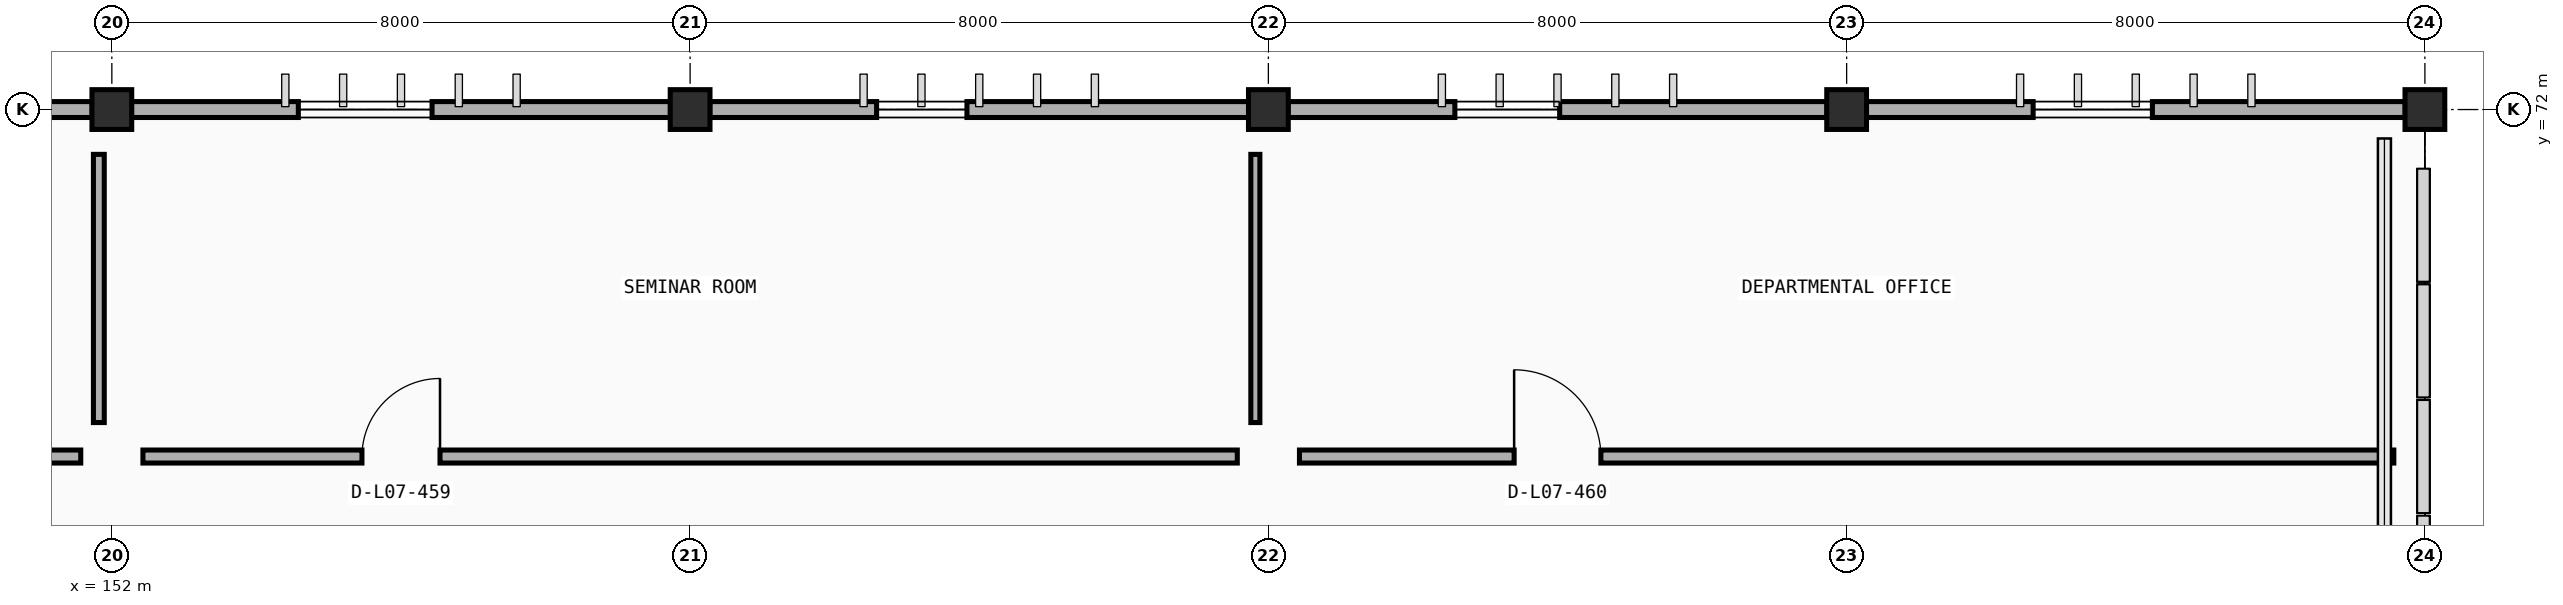
"""IFC4 building model, lengths in metres.
Left out: names, types, materials, properties, quantities, classifications, styles, units other than length and angle.
Written with IfcOpenShell. Run it as: python <this file> out.ifc"""

import sys

from ifc_helpers import new_model, si_unit, direction, frame, frame_2d, origin, origin_2d, place, context, subcontext, project, spatial, rectangle, extrude, element, fill, save


model = new_model("IFC4")
c1 = context("Model", 3, precision=1e-05, world=origin(), true_north=direction((0.0, 1.0)))
c2 = subcontext(c1, "Body", "Model", "MODEL_VIEW")
j1 = project(units=[si_unit("LENGTHUNIT", "METRE"), si_unit("PLANEANGLEUNIT", "RADIAN")], contexts=[c1])
p1 = place(None, origin())
s1 = spatial("IfcSite", under=j1, at=p1, CompositionType="ELEMENT")
p2 = place(p1, origin())
s2 = spatial("IfcBuilding", under=s1, at=p2, CompositionType="ELEMENT")
p3 = place(p2, frame((0.0, 0.0, 26.4)))
s3 = spatial("IfcBuildingStorey", under=s2, at=p3, CompositionType="ELEMENT", Elevation=26.4)
for number, where, z_axis, x_axis in (
    (1, (152.0, 72.0, 0.0), (0.0, 0.0, 1.0), (1.0, 0.0, 0.0)),
    (2, (160.0, 72.0, 0.0), (0.0, 0.0, 1.0), (1.0, 0.0, 0.0)),
    (3, (168.0, 72.0, 0.0), (0.0, 0.0, 1.0), (1.0, 0.0, 0.0)),
    (4, (176.0, 72.0, 0.0), (0.0, 0.0, 1.0), (1.0, 0.0, 0.0)),
    (5, (184.0, 72.0, 0.0), (0.0, 0.0, 1.0), (1.0, 0.0, 0.0)),
):
    element("IfcColumn", number, at=place(p3, frame(where, z_axis=z_axis, x_axis=x_axis)), inside=s3, PredefinedType="COLUMN", context=c2, shape_type="SweptSolid", body=[
        extrude(rectangle(XDim=0.55, YDim=0.55, at=origin_2d()), origin(), (0.0, 0.0, 1.0), 4.2),
    ])
p4 = place(p3, frame((144.272, 72.0, 0.0), z_axis=(0.0, 0.0, 1.0), x_axis=(1.0, 0.0, 0.0)))
e6 = element("IfcWall", 6, at=p4, inside=s3, PredefinedType="STANDARD", context=c2, shape_type="SweptSolid", body=[
    extrude(rectangle(XDim=7.456, YDim=0.22, at=frame_2d((3.728, 0.0))), origin(), (0.0, 0.0, 1.0), 3.35),
])
p5 = place(p4, frame((2.308, 0.0, 0.9)))
e7 = element("IfcOpeningElement", 7, at=p5, cuts=e6, PredefinedType="OPENING", context=c2, shape_type="SweptSolid", body=[
    extrude(rectangle(XDim=1.65, YDim=1.25, at=frame_2d((0.825, 0.625))), frame((0.0, 0.12, 0.0), z_axis=(0.0, -1.0, 0.0), x_axis=(1.0, 0.0, 0.0)), (0.0, 0.0, 1.0), 0.24),
])
p6 = place(p3, frame((152.272, 72.0, 0.0), z_axis=(0.0, 0.0, 1.0), x_axis=(1.0, 0.0, 0.0)))
e8 = element("IfcWall", 8, at=p6, inside=s3, PredefinedType="STANDARD", context=c2, shape_type="SweptSolid", body=[
    extrude(rectangle(XDim=7.456, YDim=0.22, at=frame_2d((3.728, 0.0))), origin(), (0.0, 0.0, 1.0), 3.35),
])
p7 = place(p6, frame((2.308, 0.0, 0.9)))
e9 = element("IfcOpeningElement", 9, at=p7, cuts=e8, PredefinedType="OPENING", context=c2, shape_type="SweptSolid", body=[
    extrude(rectangle(XDim=1.85, YDim=1.25, at=frame_2d((0.925, 0.625))), frame((0.0, 0.12, 0.0), z_axis=(0.0, -1.0, 0.0), x_axis=(1.0, 0.0, 0.0)), (0.0, 0.0, 1.0), 0.24),
])
p8 = place(p3, frame((160.272, 72.0, 0.0), z_axis=(0.0, 0.0, 1.0), x_axis=(1.0, 0.0, 0.0)))
e10 = element("IfcWall", 10, at=p8, inside=s3, PredefinedType="STANDARD", context=c2, shape_type="SweptSolid", body=[
    extrude(rectangle(XDim=7.456, YDim=0.22, at=frame_2d((3.728, 0.0))), origin(), (0.0, 0.0, 1.0), 3.35),
])
p9 = place(p8, frame((2.308, 0.0, 0.9)))
e11 = element("IfcOpeningElement", 11, at=p9, cuts=e10, PredefinedType="OPENING", context=c2, shape_type="SweptSolid", body=[
    extrude(rectangle(XDim=1.25, YDim=1.25, at=frame_2d((0.625, 0.625))), frame((0.0, 0.12, 0.0), z_axis=(0.0, -1.0, 0.0), x_axis=(1.0, 0.0, 0.0)), (0.0, 0.0, 1.0), 0.24),
])
p10 = place(p3, frame((168.272, 72.0, 0.0), z_axis=(0.0, 0.0, 1.0), x_axis=(1.0, 0.0, 0.0)))
e12 = element("IfcWall", 12, at=p10, inside=s3, PredefinedType="STANDARD", context=c2, shape_type="SweptSolid", body=[
    extrude(rectangle(XDim=7.456, YDim=0.22, at=frame_2d((3.728, 0.0))), origin(), (0.0, 0.0, 1.0), 3.35),
])
p11 = place(p10, frame((2.308, 0.0, 0.9)))
e13 = element("IfcOpeningElement", 13, at=p11, cuts=e12, PredefinedType="OPENING", context=c2, shape_type="SweptSolid", body=[
    extrude(rectangle(XDim=1.45, YDim=1.25, at=frame_2d((0.725, 0.625))), frame((0.0, 0.12, 0.0), z_axis=(0.0, -1.0, 0.0), x_axis=(1.0, 0.0, 0.0)), (0.0, 0.0, 1.0), 0.24),
])
p12 = place(p3, frame((176.272, 72.0, 0.0), z_axis=(0.0, 0.0, 1.0), x_axis=(1.0, 0.0, 0.0)))
e14 = element("IfcWall", 14, at=p12, inside=s3, PredefinedType="STANDARD", context=c2, shape_type="SweptSolid", body=[
    extrude(rectangle(XDim=7.456, YDim=0.22, at=frame_2d((3.728, 0.0))), origin(), (0.0, 0.0, 1.0), 3.35),
])
p13 = place(p12, frame((2.308, 0.0, 0.9)))
e15 = element("IfcOpeningElement", 15, at=p13, cuts=e14, PredefinedType="OPENING", context=c2, shape_type="SweptSolid", body=[
    extrude(rectangle(XDim=1.65, YDim=1.25, at=frame_2d((0.825, 0.625))), frame((0.0, 0.12, 0.0), z_axis=(0.0, -1.0, 0.0), x_axis=(1.0, 0.0, 0.0)), (0.0, 0.0, 1.0), 0.24),
])
p14 = place(p3, frame((183.76, 71.78, 0.0), z_axis=(0.0, 0.0, 1.0), x_axis=(-1.0, 0.0, 0.0)))
e16 = element("IfcWall", 16, at=p14, inside=s3, PredefinedType="PARAPET", context=c2, shape_type="SweptSolid", body=[
    extrude(rectangle(XDim=0.32, YDim=0.2, at=frame_2d((0.16, 0.0))), origin(), (0.0, 0.0, 1.0), 3.35),
])
p15 = place(p3, frame((128.43, 67.2, 0.0), z_axis=(0.0, 0.0, 1.0), x_axis=(1.0, 0.0, 0.0)))
e17 = element("IfcWall", 17, at=p15, inside=s3, PredefinedType="PARTITIONING", context=c2, shape_type="SweptSolid", body=[
    extrude(rectangle(XDim=23.14, YDim=0.18, at=frame_2d((11.57, 0.0))), origin(), (0.0, 0.0, 1.0), 3.3),
])
p16 = place(p15, frame((2.85, 0.0, 0.0)))
e18 = element("IfcOpeningElement", 18, at=p16, cuts=e17, PredefinedType="OPENING", context=c2, shape_type="SweptSolid", body=[
    extrude(rectangle(XDim=1.44, YDim=2.2, at=frame_2d((0.72, 1.1))), frame((0.0, 0.1, 0.0), z_axis=(0.0, -1.0, 0.0), x_axis=(1.0, 0.0, 0.0)), (0.0, 0.0, 1.0), 0.2),
])
p17 = place(p3, frame((151.82, 67.67, 0.0), z_axis=(0.0, 0.0, 1.0), x_axis=(0.0, 1.0, 0.0)))
e19 = element("IfcWall", 19, at=p17, inside=s3, PredefinedType="PARTITIONING", context=c2, shape_type="SweptSolid", body=[
    extrude(rectangle(XDim=3.71, YDim=0.15, at=frame_2d((1.855, 0.0))), origin(), (0.0, 0.0, 1.0), 3.3),
])
p18 = place(p3, frame((152.43, 67.2, 0.0), z_axis=(0.0, 0.0, 1.0), x_axis=(1.0, 0.0, 0.0)))
e20 = element("IfcWall", 20, at=p18, inside=s3, PredefinedType="PARTITIONING", context=c2, shape_type="SweptSolid", body=[
    extrude(rectangle(XDim=15.14, YDim=0.18, at=frame_2d((7.57, 0.0))), origin(), (0.0, 0.0, 1.0), 3.3),
])
p19 = place(p18, frame((3.03, 0.0, 0.0)))
e21 = element("IfcOpeningElement", 21, at=p19, cuts=e20, PredefinedType="OPENING", context=c2, shape_type="SweptSolid", body=[
    extrude(rectangle(XDim=1.08, YDim=2.15, at=frame_2d((0.54, 1.075))), frame((0.0, 0.1, 0.0), z_axis=(0.0, -1.0, 0.0), x_axis=(1.0, 0.0, 0.0)), (0.0, 0.0, 1.0), 0.2),
])
p20 = place(p3, frame((167.82, 67.67, 0.0), z_axis=(0.0, 0.0, 1.0), x_axis=(0.0, 1.0, 0.0)))
e22 = element("IfcWall", 22, at=p20, inside=s3, PredefinedType="PARTITIONING", context=c2, shape_type="SweptSolid", body=[
    extrude(rectangle(XDim=3.71, YDim=0.125, at=frame_2d((1.855, 0.0))), origin(), (0.0, 0.0, 1.0), 3.3),
])
p21 = place(p3, frame((168.43, 67.2, 0.0), z_axis=(0.0, 0.0, 1.0), x_axis=(1.0, 0.0, 0.0)))
e23 = element("IfcWall", 23, at=p21, inside=s3, PredefinedType="PARTITIONING", context=c2, shape_type="SweptSolid", body=[
    extrude(rectangle(XDim=15.14, YDim=0.18, at=frame_2d((7.57, 0.0))), origin(), (0.0, 0.0, 1.0), 3.3),
])
p22 = place(p21, frame((2.97, 0.0, 0.0)))
e24 = element("IfcOpeningElement", 24, at=p22, cuts=e23, PredefinedType="OPENING", context=c2, shape_type="SweptSolid", body=[
    extrude(rectangle(XDim=1.2, YDim=2.15, at=frame_2d((0.6, 1.075))), frame((0.0, 0.1, 0.0), z_axis=(0.0, -1.0, 0.0), x_axis=(1.0, 0.0, 0.0)), (0.0, 0.0, 1.0), 0.2),
])
p23 = place(p7, origin())
e25 = element("IfcWindow", 25, at=p23, inside=s3, PartitioningType="DOUBLE_PANEL_VERTICAL", PredefinedType="WINDOW", context=c2, shape_type="SweptSolid", body=[
    extrude(rectangle(XDim=1.85, YDim=1.25, at=frame_2d((0.925, 0.625))), frame((0.0, 0.03, 0.0), z_axis=(0.0, -1.0, 0.0), x_axis=(1.0, 0.0, 0.0)), (0.0, 0.0, 1.0), 0.06),
])
fill(e9, e25)
p24 = place(p9, origin())
e26 = element("IfcWindow", 26, at=p24, inside=s3, PartitioningType="SINGLE_PANEL", PredefinedType="WINDOW", context=c2, shape_type="SweptSolid", body=[
    extrude(rectangle(XDim=1.25, YDim=1.25, at=frame_2d((0.625, 0.625))), frame((0.0, 0.03, 0.0), z_axis=(0.0, -1.0, 0.0), x_axis=(1.0, 0.0, 0.0)), (0.0, 0.0, 1.0), 0.06),
])
fill(e11, e26)
p25 = place(p11, origin())
e27 = element("IfcWindow", 27, at=p25, inside=s3, PartitioningType="SINGLE_PANEL", PredefinedType="WINDOW", context=c2, shape_type="SweptSolid", body=[
    extrude(rectangle(XDim=1.45, YDim=1.25, at=frame_2d((0.725, 0.625))), frame((0.0, 0.03, 0.0), z_axis=(0.0, -1.0, 0.0), x_axis=(1.0, 0.0, 0.0)), (0.0, 0.0, 1.0), 0.06),
])
fill(e13, e27)
p26 = place(p13, origin())
e28 = element("IfcWindow", 28, at=p26, inside=s3, PartitioningType="DOUBLE_PANEL_VERTICAL", PredefinedType="WINDOW", context=c2, shape_type="SweptSolid", body=[
    extrude(rectangle(XDim=1.65, YDim=1.25, at=frame_2d((0.825, 0.625))), frame((0.0, 0.03, 0.0), z_axis=(0.0, -1.0, 0.0), x_axis=(1.0, 0.0, 0.0)), (0.0, 0.0, 1.0), 0.06),
])
fill(e15, e28)
p27 = place(p19, origin())
e29 = element("IfcDoor", 29, at=p27, inside=s3, OperationType="SINGLE_SWING_RIGHT", PredefinedType="DOOR", context=c2, shape_type="SweptSolid", body=[
    extrude(rectangle(XDim=1.08, YDim=2.15, at=frame_2d((0.54, 1.075))), frame((0.0, 0.025, 0.0), z_axis=(0.0, -1.0, 0.0), x_axis=(1.0, 0.0, 0.0)), (0.0, 0.0, 1.0), 0.05),
])
fill(e21, e29)
p28 = place(p22, origin())
e30 = element("IfcDoor", 30, at=p28, inside=s3, OperationType="SINGLE_SWING_LEFT", PredefinedType="DOOR", context=c2, shape_type="SweptSolid", body=[
    extrude(rectangle(XDim=1.2, YDim=2.15, at=frame_2d((0.6, 1.075))), frame((0.0, 0.025, 0.0), z_axis=(0.0, -1.0, 0.0), x_axis=(1.0, 0.0, 0.0)), (0.0, 0.0, 1.0), 0.05),
])
fill(e24, e30)
save(model, sys.argv[1])
